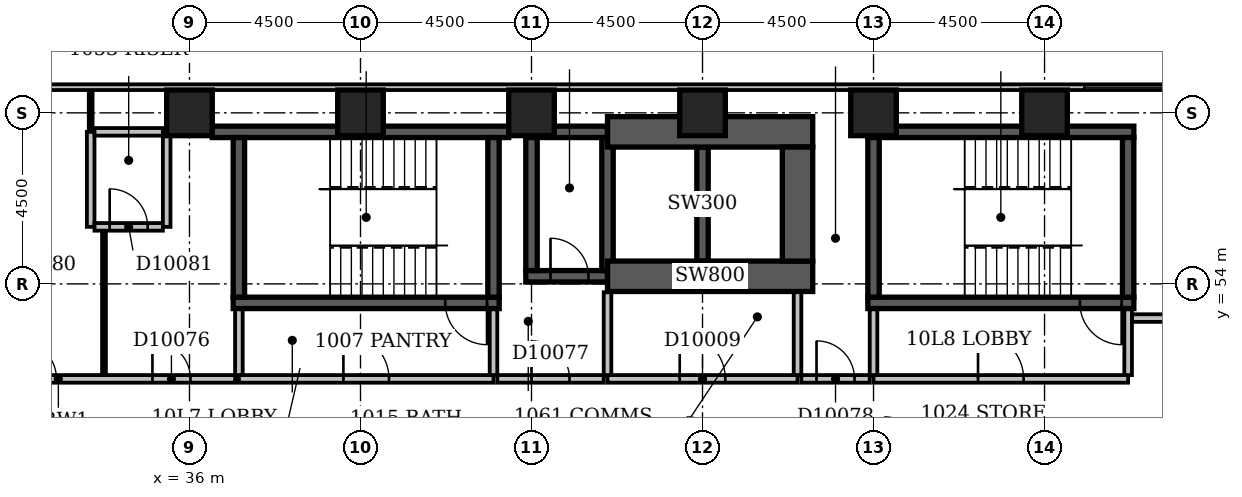
"""IFC4 building model, lengths in metres.
Left out: names, types, materials, properties, quantities, classifications, styles, units other than length and angle.
Written with IfcOpenShell. Run it as: python <this file> out.ifc"""

import sys

from ifc_helpers import new_model, si_unit, direction, frame, frame_2d, origin, origin_2d, place, context, subcontext, project, spatial, rectangle, extrude, element, fill, save


model = new_model("IFC4")
c1 = context("Model", 3, precision=1e-05, world=origin(), true_north=direction((0.0, 1.0)))
c2 = subcontext(c1, "Body", "Model", "MODEL_VIEW")
j1 = project(units=[si_unit("LENGTHUNIT", "METRE"), si_unit("PLANEANGLEUNIT", "RADIAN")], contexts=[c1])
p1 = place(None, origin())
s1 = spatial("IfcSite", under=j1, at=p1, CompositionType="ELEMENT")
p2 = place(p1, origin())
s2 = spatial("IfcBuilding", under=s1, at=p2, CompositionType="ELEMENT")
p3 = place(p2, frame((0.0, 0.0, 47.0)))
s3 = spatial("IfcBuildingStorey", under=s2, at=p3, CompositionType="ELEMENT", Elevation=47.0)
p4 = place(p3, frame((36.6, 58.0, -0.3), z_axis=(0.0, 0.0, 1.0), x_axis=(1.0, 0.0, 0.0)))
e1 = element("IfcWall", 1, at=p4, inside=s3, PredefinedType="SHEAR", context=c2, shape_type="SweptSolid", body=[
    extrude(rectangle(XDim=7.8, YDim=0.3, at=frame_2d((3.9, 0.0))), origin(), (0.0, 0.0, 1.0), 3.6),
])
p5 = place(p3, frame((37.15, 53.5, -0.3), z_axis=(0.0, 0.0, 1.0), x_axis=(1.0, 0.0, 0.0)))
e2 = element("IfcWall", 2, at=p5, inside=s3, PredefinedType="SHEAR", context=c2, shape_type="SweptSolid", body=[
    extrude(rectangle(XDim=7.0, YDim=0.3, at=frame_2d((3.5, 0.0))), origin(), (0.0, 0.0, 1.0), 3.6),
])
p6 = place(p5, frame((5.58, 0.0, 0.3)))
e3 = element("IfcOpeningElement", 3, at=p6, cuts=e2, PredefinedType="OPENING", context=c2, shape_type="SweptSolid", body=[
    extrude(rectangle(XDim=1.1, YDim=2.1, at=frame_2d((0.55, 1.05))), frame((0.0, 0.162, 0.0), z_axis=(0.0, -1.0, 0.0), x_axis=(1.0, 0.0, 0.0)), (0.0, 0.0, 1.0), 0.324),
])
for number, where, z_axis, x_axis in (
    (4, (37.3, 53.65, -0.3), (0.0, 0.0, 1.0), (0.0, 1.0, 0.0)),
    (5, (44.0, 53.65, -0.3), (0.0, 0.0, 1.0), (0.0, 1.0, 0.0)),
):
    element("IfcWall", number, at=place(p3, frame(where, z_axis=z_axis, x_axis=x_axis)), inside=s3, PredefinedType="SHEAR", context=c2, shape_type="SweptSolid", body=[
        extrude(rectangle(XDim=4.2, YDim=0.3, at=frame_2d((2.1, 0.0))), origin(), (0.0, 0.0, 1.0), 3.6),
    ])
p7 = place(p3, frame((44.85, 54.2, -0.3), z_axis=(0.0, 0.0, 1.0), x_axis=(1.0, 0.0, 0.0)))
e6 = element("IfcWall", 6, at=p7, inside=s3, PredefinedType="SHEAR", context=c2, shape_type="SweptSolid", body=[
    extrude(rectangle(XDim=2.15, YDim=0.3, at=frame_2d((1.075, 0.0))), origin(), (0.0, 0.0, 1.0), 3.6),
])
p8 = place(p7, frame((0.65, 0.0, 0.3)))
e7 = element("IfcOpeningElement", 7, at=p8, cuts=e6, PredefinedType="OPENING", context=c2, shape_type="SweptSolid", body=[
    extrude(rectangle(XDim=1.0, YDim=2.1, at=frame_2d((0.5, 1.05))), frame((0.0, 0.162, 0.0), z_axis=(0.0, -1.0, 0.0), x_axis=(1.0, 0.0, 0.0)), (0.0, 0.0, 1.0), 0.324),
])
p9 = place(p3, frame((44.85, 58.0, -0.3), z_axis=(0.0, 0.0, 1.0), x_axis=(1.0, 0.0, 0.0)))
e8 = element("IfcWall", 8, at=p9, inside=s3, PredefinedType="SHEAR", context=c2, shape_type="SweptSolid", body=[
    extrude(rectangle(XDim=2.15, YDim=0.3, at=frame_2d((1.075, 0.0))), origin(), (0.0, 0.0, 1.0), 3.6),
])
p10 = place(p3, frame((45.0, 54.35, -0.3), z_axis=(0.0, 0.0, 1.0), x_axis=(0.0, 1.0, 0.0)))
e9 = element("IfcWall", 9, at=p10, inside=s3, PredefinedType="SHEAR", context=c2, shape_type="SweptSolid", body=[
    extrude(rectangle(XDim=3.5, YDim=0.3, at=frame_2d((1.75, 0.0))), origin(), (0.0, 0.0, 1.0), 3.6),
])
p11 = place(p3, frame((47.0, 54.2, -0.3), z_axis=(0.0, 0.0, 1.0), x_axis=(1.0, 0.0, 0.0)))
e10 = element("IfcWall", 10, at=p11, inside=s3, PredefinedType="SHEAR", context=c2, shape_type="SweptSolid", body=[
    extrude(rectangle(XDim=5.4, YDim=0.8, at=frame_2d((2.7, 0.0))), origin(), (0.0, 0.0, 1.0), 3.6),
])
p12 = place(p3, frame((47.0, 54.35, -0.3), z_axis=(0.0, 0.0, 1.0), x_axis=(0.0, 1.0, 0.0)))
e11 = element("IfcWall", 11, at=p12, inside=s3, PredefinedType="SHEAR", context=c2, shape_type="SweptSolid", body=[
    extrude(rectangle(XDim=3.5, YDim=0.3, at=frame_2d((1.75, 0.0))), origin(), (0.0, 0.0, 1.0), 3.6),
])
p13 = place(p3, frame((47.0, 58.0, -0.3), z_axis=(0.0, 0.0, 1.0), x_axis=(1.0, 0.0, 0.0)))
e12 = element("IfcWall", 12, at=p13, inside=s3, PredefinedType="SHEAR", context=c2, shape_type="SweptSolid", body=[
    extrude(rectangle(XDim=5.4, YDim=0.8, at=frame_2d((2.7, 0.0))), origin(), (0.0, 0.0, 1.0), 3.6),
])
p14 = place(p3, frame((49.5, 54.6, -0.3), z_axis=(0.0, 0.0, 1.0), x_axis=(0.0, 1.0, 0.0)))
e13 = element("IfcWall", 13, at=p14, inside=s3, PredefinedType="SHEAR", context=c2, shape_type="SweptSolid", body=[
    extrude(rectangle(XDim=3.0, YDim=0.3, at=frame_2d((1.5, 0.0))), origin(), (0.0, 0.0, 1.0), 3.6),
])
p15 = place(p3, frame((52.0, 54.6, -0.3), z_axis=(0.0, 0.0, 1.0), x_axis=(0.0, 1.0, 0.0)))
e14 = element("IfcWall", 14, at=p15, inside=s3, PredefinedType="SHEAR", context=c2, shape_type="SweptSolid", body=[
    extrude(rectangle(XDim=3.0, YDim=0.8, at=frame_2d((1.5, 0.0))), origin(), (0.0, 0.0, 1.0), 3.6),
])
p16 = place(p3, frame((53.85, 53.5, -0.3), z_axis=(0.0, 0.0, 1.0), x_axis=(1.0, 0.0, 0.0)))
e15 = element("IfcWall", 15, at=p16, inside=s3, PredefinedType="SHEAR", context=c2, shape_type="SweptSolid", body=[
    extrude(rectangle(XDim=7.0, YDim=0.3, at=frame_2d((3.5, 0.0))), origin(), (0.0, 0.0, 1.0), 3.6),
])
p17 = place(p16, frame((5.58, 0.0, 0.3)))
e16 = element("IfcOpeningElement", 16, at=p17, cuts=e15, PredefinedType="OPENING", context=c2, shape_type="SweptSolid", body=[
    extrude(rectangle(XDim=1.1, YDim=2.1, at=frame_2d((0.55, 1.05))), frame((0.0, 0.162, 0.0), z_axis=(0.0, -1.0, 0.0), x_axis=(1.0, 0.0, 0.0)), (0.0, 0.0, 1.0), 0.324),
])
p18 = place(p3, frame((53.85, 58.0, -0.3), z_axis=(0.0, 0.0, 1.0), x_axis=(1.0, 0.0, 0.0)))
e17 = element("IfcWall", 17, at=p18, inside=s3, PredefinedType="SHEAR", context=c2, shape_type="SweptSolid", body=[
    extrude(rectangle(XDim=7.0, YDim=0.3, at=frame_2d((3.5, 0.0))), origin(), (0.0, 0.0, 1.0), 3.6),
])
for number, where, z_axis, x_axis in (
    (18, (54.0, 53.65, -0.3), (0.0, 0.0, 1.0), (0.0, 1.0, 0.0)),
    (19, (60.7, 53.65, -0.3), (0.0, 0.0, 1.0), (0.0, 1.0, 0.0)),
):
    element("IfcWall", number, at=place(p3, frame(where, z_axis=z_axis, x_axis=x_axis)), inside=s3, PredefinedType="SHEAR", context=c2, shape_type="SweptSolid", body=[
        extrude(rectangle(XDim=4.2, YDim=0.3, at=frame_2d((2.1, 0.0))), origin(), (0.0, 0.0, 1.0), 3.6),
    ])
for number, where, z_axis, x_axis in (
    (20, (36.0, 58.5, -0.3), (0.0, 0.0, 1.0), (1.0, 0.0, 0.0)),
    (21, (40.5, 58.5, -0.3), (0.0, 0.0, 1.0), (1.0, 0.0, 0.0)),
    (22, (45.0, 58.5, -0.3), (0.0, 0.0, 1.0), (1.0, 0.0, 0.0)),
    (23, (49.5, 58.5, -0.3), (0.0, 0.0, 1.0), (1.0, 0.0, 0.0)),
    (24, (54.0, 58.5, -0.3), (0.0, 0.0, 1.0), (1.0, 0.0, 0.0)),
    (25, (58.5, 58.5, -0.3), (0.0, 0.0, 1.0), (1.0, 0.0, 0.0)),
):
    element("IfcColumn", number, at=place(p3, frame(where, z_axis=z_axis, x_axis=x_axis)), inside=s3, PredefinedType="COLUMN", context=c2, shape_type="SweptSolid", body=[
        extrude(rectangle(XDim=1.2, YDim=1.2, at=origin_2d()), origin(), (0.0, 0.0, 1.0), 3.6),
    ])
p19 = place(p3, frame((68.1, 59.175, 0.0), z_axis=(0.0, 0.0, 1.0), x_axis=(-1.0, 0.0, 0.0)))
e26 = element("IfcWall", 26, at=p19, inside=s3, PredefinedType="STANDARD", context=c2, shape_type="SweptSolid", body=[
    extrude(rectangle(XDim=68.85, YDim=0.15, at=frame_2d((34.425, 0.0))), origin(), (0.0, 0.0, 1.0), 2.7),
])
p20 = place(p19, frame((2.67, 0.0, 0.6)))
e27 = element("IfcOpeningElement", 27, at=p20, cuts=e26, PredefinedType="OPENING", context=c2, shape_type="SweptSolid", body=[
    extrude(rectangle(XDim=1.5, YDim=1.8, at=frame_2d((0.75, 0.9))), frame((0.0, 0.087, 0.0), z_axis=(0.0, -1.0, 0.0), x_axis=(1.0, 0.0, 0.0)), (0.0, 0.0, 1.0), 0.174),
])
p21 = place(p19, frame((6.15, 0.0, 0.6)))
e28 = element("IfcOpeningElement", 28, at=p21, cuts=e26, PredefinedType="OPENING", context=c2, shape_type="SweptSolid", body=[
    extrude(rectangle(XDim=2.4, YDim=1.8, at=frame_2d((1.2, 0.9))), frame((0.0, 0.087, 0.0), z_axis=(0.0, -1.0, 0.0), x_axis=(1.0, 0.0, 0.0)), (0.0, 0.0, 1.0), 0.174),
])
p22 = place(p19, frame((37.65, 0.0, 0.6)))
e29 = element("IfcOpeningElement", 29, at=p22, cuts=e26, PredefinedType="OPENING", context=c2, shape_type="SweptSolid", body=[
    extrude(rectangle(XDim=2.4, YDim=1.8, at=frame_2d((1.2, 0.9))), frame((0.0, 0.087, 0.0), z_axis=(0.0, -1.0, 0.0), x_axis=(1.0, 0.0, 0.0)), (0.0, 0.0, 1.0), 0.174),
])
p23 = place(p3, frame((47.0, 51.5, 0.0), z_axis=(0.0, 0.0, 1.0), x_axis=(1.0, 0.0, 0.0)))
e30 = element("IfcWall", 30, at=p23, inside=s3, PredefinedType="PARTITIONING", context=c2, shape_type="SweptSolid", body=[
    extrude(rectangle(XDim=5.0, YDim=0.2, at=frame_2d((2.5, 0.0))), origin(), (0.0, 0.0, 1.0), 3.3),
])
p24 = place(p23, frame((1.9, 0.0, 0.0)))
e31 = element("IfcOpeningElement", 31, at=p24, cuts=e30, PredefinedType="OPENING", context=c2, shape_type="SweptSolid", body=[
    extrude(rectangle(XDim=1.2, YDim=2.1, at=frame_2d((0.6, 1.05))), frame((0.0, 0.112, 0.0), z_axis=(0.0, -1.0, 0.0), x_axis=(1.0, 0.0, 0.0)), (0.0, 0.0, 1.0), 0.224),
])
for number, where, z_axis, x_axis in (
    (32, (52.0, 51.6, 0.0), (0.0, 0.0, 1.0), (0.0, 1.0, 0.0)),
    (33, (47.0, 51.6, 0.0), (0.0, 0.0, 1.0), (0.0, 1.0, 0.0)),
):
    element("IfcWall", number, at=place(p3, frame(where, z_axis=z_axis, x_axis=x_axis)), inside=s3, PredefinedType="PARTITIONING", context=c2, shape_type="SweptSolid", body=[
        extrude(rectangle(XDim=2.18, YDim=0.2, at=frame_2d((1.09, 0.0))), origin(), (0.0, 0.0, 1.0), 3.3),
    ])
p25 = place(p3, frame((37.3, 51.5, 0.0), z_axis=(0.0, 0.0, 1.0), x_axis=(1.0, 0.0, 0.0)))
e34 = element("IfcWall", 34, at=p25, inside=s3, PredefinedType="PARTITIONING", context=c2, shape_type="SweptSolid", body=[
    extrude(rectangle(XDim=6.7, YDim=0.2, at=frame_2d((3.35, 0.0))), origin(), (0.0, 0.0, 1.0), 3.3),
])
p26 = place(p25, frame((2.75, 0.0, 0.0)))
e35 = element("IfcOpeningElement", 35, at=p26, cuts=e34, PredefinedType="OPENING", context=c2, shape_type="SweptSolid", body=[
    extrude(rectangle(XDim=1.2, YDim=2.1, at=frame_2d((0.6, 1.05))), frame((0.0, 0.112, 0.0), z_axis=(0.0, -1.0, 0.0), x_axis=(1.0, 0.0, 0.0)), (0.0, 0.0, 1.0), 0.224),
])
for number, where, z_axis, x_axis in (
    (36, (44.0, 51.6, 0.0), (0.0, 0.0, 1.0), (0.0, 1.0, 0.0)),
    (37, (37.3, 51.6, 0.0), (0.0, 0.0, 1.0), (0.0, 1.0, 0.0)),
):
    element("IfcWall", number, at=place(p3, frame(where, z_axis=z_axis, x_axis=x_axis)), inside=s3, PredefinedType="PARTITIONING", context=c2, shape_type="SweptSolid", body=[
        extrude(rectangle(XDim=1.73, YDim=0.2, at=frame_2d((0.865, 0.0))), origin(), (0.0, 0.0, 1.0), 3.3),
    ])
p27 = place(p3, frame((54.0, 51.5, 0.0), z_axis=(0.0, 0.0, 1.0), x_axis=(1.0, 0.0, 0.0)))
e38 = element("IfcWall", 38, at=p27, inside=s3, PredefinedType="PARTITIONING", context=c2, shape_type="SweptSolid", body=[
    extrude(rectangle(XDim=6.7, YDim=0.2, at=frame_2d((3.35, 0.0))), origin(), (0.0, 0.0, 1.0), 3.3),
])
p28 = place(p27, frame((2.75, 0.0, 0.0)))
e39 = element("IfcOpeningElement", 39, at=p28, cuts=e38, PredefinedType="OPENING", context=c2, shape_type="SweptSolid", body=[
    extrude(rectangle(XDim=1.2, YDim=2.1, at=frame_2d((0.6, 1.05))), frame((0.0, 0.112, 0.0), z_axis=(0.0, -1.0, 0.0), x_axis=(1.0, 0.0, 0.0)), (0.0, 0.0, 1.0), 0.224),
])
p29 = place(p3, frame((60.7, 51.6, 0.0), z_axis=(0.0, 0.0, 1.0), x_axis=(0.0, 1.0, 0.0)))
e40 = element("IfcWall", 40, at=p29, inside=s3, PredefinedType="PARTITIONING", context=c2, shape_type="SweptSolid", body=[
    extrude(rectangle(XDim=1.73, YDim=0.2, at=frame_2d((0.865, 0.0))), origin(), (0.0, 0.0, 1.0), 3.3),
])
p30 = place(p3, frame((54.0, 51.6, 0.0), z_axis=(0.0, 0.0, 1.0), x_axis=(0.0, 1.0, 0.0)))
e41 = element("IfcWall", 41, at=p30, inside=s3, PredefinedType="PARTITIONING", context=c2, shape_type="SweptSolid", body=[
    extrude(rectangle(XDim=1.73, YDim=0.2, at=frame_2d((0.865, 0.0))), origin(), (0.0, 0.0, 1.0), 2.6),
])
p31 = place(p3, frame((27.9, 51.5, 0.0), z_axis=(0.0, 0.0, 1.0), x_axis=(1.0, 0.0, 0.0)))
e42 = element("IfcWall", 42, at=p31, inside=s3, PredefinedType="PARTITIONING", context=c2, shape_type="SweptSolid", body=[
    extrude(rectangle(XDim=9.3, YDim=0.2, at=frame_2d((4.65, 0.0))), origin(), (0.0, 0.0, 1.0), 3.3),
])
p32 = place(p31, frame((0.675, 0.0, 0.0)))
e43 = element("IfcOpeningElement", 43, at=p32, cuts=e42, PredefinedType="OPENING", context=c2, shape_type="SweptSolid", body=[
    extrude(rectangle(XDim=0.9, YDim=2.1, at=frame_2d((0.45, 1.05))), frame((0.0, 0.112, 0.0), z_axis=(0.0, -1.0, 0.0), x_axis=(1.0, 0.0, 0.0)), (0.0, 0.0, 1.0), 0.224),
])
p33 = place(p31, frame((3.6, 0.0, 0.0)))
e44 = element("IfcOpeningElement", 44, at=p33, cuts=e42, PredefinedType="OPENING", context=c2, shape_type="SweptSolid", body=[
    extrude(rectangle(XDim=1.0, YDim=2.1, at=frame_2d((0.5, 1.05))), frame((0.0, 0.112, 0.0), z_axis=(0.0, -1.0, 0.0), x_axis=(1.0, 0.0, 0.0)), (0.0, 0.0, 1.0), 0.224),
])
p34 = place(p31, frame((7.125, 0.0, 0.0)))
e45 = element("IfcOpeningElement", 45, at=p34, cuts=e42, PredefinedType="OPENING", context=c2, shape_type="SweptSolid", body=[
    extrude(rectangle(XDim=1.0, YDim=2.1, at=frame_2d((0.5, 1.05))), frame((0.0, 0.112, 0.0), z_axis=(0.0, -1.0, 0.0), x_axis=(1.0, 0.0, 0.0)), (0.0, 0.0, 1.0), 0.224),
])
p35 = place(p3, frame((44.1, 51.5, 0.0), z_axis=(0.0, 0.0, 1.0), x_axis=(1.0, 0.0, 0.0)))
e46 = element("IfcWall", 46, at=p35, inside=s3, PredefinedType="PARTITIONING", context=c2, shape_type="SweptSolid", body=[
    extrude(rectangle(XDim=2.8, YDim=0.2, at=frame_2d((1.4, 0.0))), origin(), (0.0, 0.0, 1.0), 3.3),
])
p36 = place(p35, frame((0.9, 0.0, 0.0)))
e47 = element("IfcOpeningElement", 47, at=p36, cuts=e46, PredefinedType="OPENING", context=c2, shape_type="SweptSolid", body=[
    extrude(rectangle(XDim=1.0, YDim=2.1, at=frame_2d((0.5, 1.05))), frame((0.0, 0.112, 0.0), z_axis=(0.0, -1.0, 0.0), x_axis=(1.0, 0.0, 0.0)), (0.0, 0.0, 1.0), 0.224),
])
p37 = place(p3, frame((52.1, 51.5, 0.0), z_axis=(0.0, 0.0, 1.0), x_axis=(1.0, 0.0, 0.0)))
e48 = element("IfcWall", 48, at=p37, inside=s3, PredefinedType="PARTITIONING", context=c2, shape_type="SweptSolid", body=[
    extrude(rectangle(XDim=1.8, YDim=0.2, at=frame_2d((0.9, 0.0))), origin(), (0.0, 0.0, 1.0), 3.3),
])
p38 = place(p37, frame((0.4, 0.0, 0.0)))
e49 = element("IfcOpeningElement", 49, at=p38, cuts=e48, PredefinedType="OPENING", context=c2, shape_type="SweptSolid", body=[
    extrude(rectangle(XDim=1.0, YDim=2.1, at=frame_2d((0.5, 1.05))), frame((0.0, 0.112, 0.0), z_axis=(0.0, -1.0, 0.0), x_axis=(1.0, 0.0, 0.0)), (0.0, 0.0, 1.0), 0.224),
])
p39 = place(p3, frame((33.75, 51.6, 0.0), z_axis=(0.0, 0.0, 1.0), x_axis=(0.0, 1.0, 0.0)))
e50 = element("IfcWall", 50, at=p39, inside=s3, PredefinedType="PARTITIONING", context=c2, shape_type="SweptSolid", body=[
    extrude(rectangle(XDim=3.8, YDim=0.1, at=frame_2d((1.9, 0.0))), origin(), (0.0, 0.0, 1.0), 3.3),
])
p40 = place(p3, frame((60.8, 53.1, 0.0), z_axis=(0.0, 0.0, 1.0), x_axis=(1.0, 0.0, 0.0)))
e51 = element("IfcWall", 51, at=p40, inside=s3, PredefinedType="PARTITIONING", context=c2, shape_type="SweptSolid", body=[
    extrude(rectangle(XDim=7.3, YDim=0.2, at=frame_2d((3.65, 0.0))), origin(), (0.0, 0.0, 1.0), 3.3),
])
p41 = place(p40, frame((2.85, 0.0, 0.0)))
e52 = element("IfcOpeningElement", 52, at=p41, cuts=e51, PredefinedType="OPENING", context=c2, shape_type="SweptSolid", body=[
    extrude(rectangle(XDim=0.9, YDim=2.1, at=frame_2d((0.45, 1.05))), frame((0.0, 0.112, 0.0), z_axis=(0.0, -1.0, 0.0), x_axis=(1.0, 0.0, 0.0)), (0.0, 0.0, 1.0), 0.224),
])
p42 = place(p3, frame((33.4, 55.5, 0.0), z_axis=(0.0, 0.0, 1.0), x_axis=(0.0, 1.0, 0.0)))
e53 = element("IfcWall", 53, at=p42, inside=s3, PredefinedType="PARTITIONING", context=c2, shape_type="SweptSolid", body=[
    extrude(rectangle(XDim=2.5, YDim=0.2, at=frame_2d((1.25, 0.0))), origin(), (0.0, 0.0, 1.0), 3.3),
])
p43 = place(p3, frame((33.5, 55.5, 0.0), z_axis=(0.0, 0.0, 1.0), x_axis=(1.0, 0.0, 0.0)))
e54 = element("IfcWall", 54, at=p43, inside=s3, PredefinedType="PARTITIONING", context=c2, shape_type="SweptSolid", body=[
    extrude(rectangle(XDim=1.8, YDim=0.2, at=frame_2d((0.9, 0.0))), origin(), (0.0, 0.0, 1.0), 3.3),
])
p44 = place(p43, frame((0.4, 0.0, 0.0)))
e55 = element("IfcOpeningElement", 55, at=p44, cuts=e54, PredefinedType="OPENING", context=c2, shape_type="SweptSolid", body=[
    extrude(rectangle(XDim=1.0, YDim=2.1, at=frame_2d((0.5, 1.05))), frame((0.0, 0.112, 0.0), z_axis=(0.0, -1.0, 0.0), x_axis=(1.0, 0.0, 0.0)), (0.0, 0.0, 1.0), 0.224),
])
p45 = place(p3, frame((35.4, 55.5, 0.0), z_axis=(0.0, 0.0, 1.0), x_axis=(0.0, 1.0, 0.0)))
e56 = element("IfcWall", 56, at=p45, inside=s3, PredefinedType="PARTITIONING", context=c2, shape_type="SweptSolid", body=[
    extrude(rectangle(XDim=2.5, YDim=0.2, at=frame_2d((1.25, 0.0))), origin(), (0.0, 0.0, 1.0), 2.4),
])
p46 = place(p3, frame((33.4, 58.0, 0.0), z_axis=(0.0, 0.0, 1.0), x_axis=(0.0, 1.0, 0.0)))
e57 = element("IfcWall", 57, at=p46, inside=s3, PredefinedType="PARTITIONING", context=c2, shape_type="SweptSolid", body=[
    extrude(rectangle(XDim=1.1, YDim=0.1, at=frame_2d((0.55, 0.0))), origin(), (0.0, 0.0, 1.0), 3.3),
])
p47 = place(p3, frame((33.5, 58.0, 0.0), z_axis=(0.0, 0.0, 1.0), x_axis=(1.0, 0.0, 0.0)))
e58 = element("IfcWall", 58, at=p47, inside=s3, PredefinedType="PARTITIONING", context=c2, shape_type="SweptSolid", body=[
    extrude(rectangle(XDim=1.8, YDim=0.2, at=frame_2d((0.9, 0.0))), origin(), (0.0, 0.0, 1.0), 3.3),
])
p48 = place(p21, origin())
e59 = element("IfcWindow", 59, at=p48, inside=s3, PartitioningType="SINGLE_PANEL", PredefinedType="WINDOW", context=c2, shape_type="SweptSolid", body=[
    extrude(rectangle(XDim=2.4, YDim=1.8, at=frame_2d((1.2, 0.9))), frame((0.0, 0.03, 0.0), z_axis=(0.0, -1.0, 0.0), x_axis=(1.0, 0.0, 0.0)), (0.0, 0.0, 1.0), 0.06),
])
fill(e28, e59)
p49 = place(p26, origin())
e60 = element("IfcDoor", 60, at=p49, inside=s3, OperationType="SINGLE_SWING_LEFT", PredefinedType="DOOR", context=c2, shape_type="SweptSolid", body=[
    extrude(rectangle(XDim=1.2, YDim=2.1, at=frame_2d((0.6, 1.05))), frame((0.0, 0.025, 0.0), z_axis=(0.0, -1.0, 0.0), x_axis=(1.0, 0.0, 0.0)), (0.0, 0.0, 1.0), 0.05),
])
fill(e35, e60)
p50 = place(p28, origin())
e61 = element("IfcDoor", 61, at=p50, inside=s3, OperationType="SINGLE_SWING_LEFT", PredefinedType="DOOR", context=c2, shape_type="SweptSolid", body=[
    extrude(rectangle(XDim=1.2, YDim=2.1, at=frame_2d((0.6, 1.05))), frame((0.0, 0.025, 0.0), z_axis=(0.0, -1.0, 0.0), x_axis=(1.0, 0.0, 0.0)), (0.0, 0.0, 1.0), 0.05),
])
fill(e39, e61)
p51 = place(p24, origin())
e62 = element("IfcDoor", 62, at=p51, inside=s3, OperationType="SINGLE_SWING_LEFT", PredefinedType="DOOR", context=c2, shape_type="SweptSolid", body=[
    extrude(rectangle(XDim=1.2, YDim=2.1, at=frame_2d((0.6, 1.05))), frame((0.0, 0.025, 0.0), z_axis=(0.0, -1.0, 0.0), x_axis=(1.0, 0.0, 0.0)), (0.0, 0.0, 1.0), 0.05),
])
fill(e31, e62)
p52 = place(p8, origin())
e63 = element("IfcDoor", 63, at=p52, inside=s3, OperationType="SINGLE_SWING_LEFT", PredefinedType="DOOR", context=c2, shape_type="SweptSolid", body=[
    extrude(rectangle(XDim=1.0, YDim=2.1, at=frame_2d((0.5, 1.05))), frame((0.0, 0.025, 0.0), z_axis=(0.0, -1.0, 0.0), x_axis=(1.0, 0.0, 0.0)), (0.0, 0.0, 1.0), 0.05),
])
fill(e7, e63)
p53 = place(p6, origin())
e64 = element("IfcDoor", 64, at=p53, inside=s3, OperationType="SINGLE_SWING_RIGHT", PredefinedType="DOOR", context=c2, shape_type="SweptSolid", body=[
    extrude(rectangle(XDim=1.1, YDim=2.1, at=frame_2d((0.55, 1.05))), frame((0.0, 0.025, 0.0), z_axis=(0.0, -1.0, 0.0), x_axis=(1.0, 0.0, 0.0)), (0.0, 0.0, 1.0), 0.05),
])
fill(e3, e64)
p54 = place(p17, origin())
e65 = element("IfcDoor", 65, at=p54, inside=s3, OperationType="SINGLE_SWING_RIGHT", PredefinedType="DOOR", context=c2, shape_type="SweptSolid", body=[
    extrude(rectangle(XDim=1.1, YDim=2.1, at=frame_2d((0.55, 1.05))), frame((0.0, 0.025, 0.0), z_axis=(0.0, -1.0, 0.0), x_axis=(1.0, 0.0, 0.0)), (0.0, 0.0, 1.0), 0.05),
])
fill(e16, e65)
p55 = place(p33, origin())
e66 = element("IfcDoor", 66, at=p55, inside=s3, OperationType="SINGLE_SWING_LEFT", PredefinedType="DOOR", context=c2, shape_type="SweptSolid", body=[
    extrude(rectangle(XDim=1.0, YDim=2.1, at=frame_2d((0.5, 1.05))), frame((0.0, 0.025, 0.0), z_axis=(0.0, -1.0, 0.0), x_axis=(1.0, 0.0, 0.0)), (0.0, 0.0, 1.0), 0.05),
])
fill(e44, e66)
p56 = place(p34, origin())
e67 = element("IfcDoor", 67, at=p56, inside=s3, OperationType="SINGLE_SWING_LEFT", PredefinedType="DOOR", context=c2, shape_type="SweptSolid", body=[
    extrude(rectangle(XDim=1.0, YDim=2.1, at=frame_2d((0.5, 1.05))), frame((0.0, 0.025, 0.0), z_axis=(0.0, -1.0, 0.0), x_axis=(1.0, 0.0, 0.0)), (0.0, 0.0, 1.0), 0.05),
])
fill(e45, e67)
p57 = place(p36, origin())
e68 = element("IfcDoor", 68, at=p57, inside=s3, OperationType="SINGLE_SWING_LEFT", PredefinedType="DOOR", context=c2, shape_type="SweptSolid", body=[
    extrude(rectangle(XDim=1.0, YDim=2.1, at=frame_2d((0.5, 1.05))), frame((0.0, 0.025, 0.0), z_axis=(0.0, -1.0, 0.0), x_axis=(1.0, 0.0, 0.0)), (0.0, 0.0, 1.0), 0.05),
])
fill(e47, e68)
p58 = place(p38, origin())
e69 = element("IfcDoor", 69, at=p58, inside=s3, OperationType="SINGLE_SWING_LEFT", PredefinedType="DOOR", context=c2, shape_type="SweptSolid", body=[
    extrude(rectangle(XDim=1.0, YDim=2.1, at=frame_2d((0.5, 1.05))), frame((0.0, 0.025, 0.0), z_axis=(0.0, -1.0, 0.0), x_axis=(1.0, 0.0, 0.0)), (0.0, 0.0, 1.0), 0.05),
])
fill(e49, e69)
p59 = place(p44, origin())
e70 = element("IfcDoor", 70, at=p59, inside=s3, OperationType="SINGLE_SWING_LEFT", PredefinedType="DOOR", context=c2, shape_type="SweptSolid", body=[
    extrude(rectangle(XDim=1.0, YDim=2.1, at=frame_2d((0.5, 1.05))), frame((0.0, 0.025, 0.0), z_axis=(0.0, -1.0, 0.0), x_axis=(1.0, 0.0, 0.0)), (0.0, 0.0, 1.0), 0.05),
])
fill(e55, e70)
save(model, sys.argv[1])
